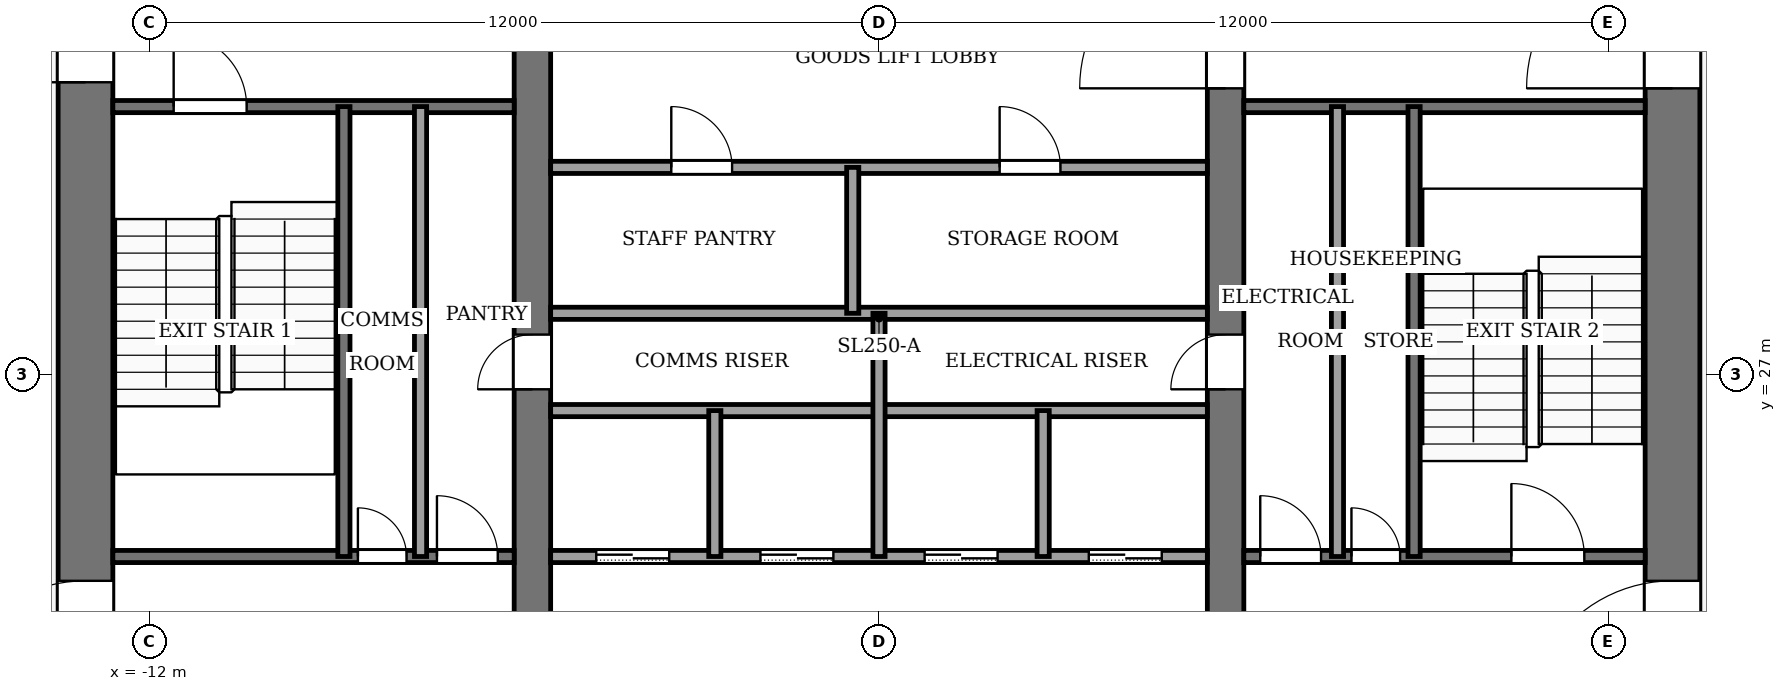
"""IFC4 building model, lengths in metres.
Left out: names, types, materials, properties, quantities, classifications, styles, units other than length and angle.
Written with IfcOpenShell. Run it as: python <this file> out.ifc"""

import sys

from ifc_helpers import new_model, si_unit, direction, frame, frame_2d, origin, place, context, subcontext, project, spatial, rectangle, extrude, element, fill, save


model = new_model("IFC4")
c1 = context("Model", 3, precision=1e-05, world=origin(), true_north=direction((0.0, 1.0)))
c2 = subcontext(c1, "Body", "Model", "MODEL_VIEW")
j1 = project(units=[si_unit("LENGTHUNIT", "METRE"), si_unit("PLANEANGLEUNIT", "RADIAN")], contexts=[c1])
p1 = place(None, origin())
s1 = spatial("IfcSite", under=j1, at=p1, CompositionType="ELEMENT")
p2 = place(p1, origin())
s2 = spatial("IfcBuilding", under=s1, at=p2, CompositionType="ELEMENT")
p3 = place(p2, frame((0.0, 0.0, 206.0)))
s3 = spatial("IfcBuildingStorey", under=s2, at=p3, CompositionType="ELEMENT", Elevation=206.0)
p4 = place(p3, frame((-13.05, 18.4, -0.13), z_axis=(0.0, 0.0, 1.0), x_axis=(0.0, 1.0, 0.0)))
e1 = element("IfcWall", 1, at=p4, inside=s3, PredefinedType="SHEAR", context=c2, shape_type="SweptSolid", body=[
    extrude(rectangle(XDim=19.2, YDim=0.9, at=frame_2d((9.6, 0.0))), origin(), (0.0, 0.0, 1.0), 4.0),
])
p5 = place(p4, frame((2.8, 0.0, 0.13)))
e2 = element("IfcOpeningElement", 2, at=p5, cuts=e1, PredefinedType="OPENING", context=c2, shape_type="SweptSolid", body=[
    extrude(rectangle(XDim=2.4, YDim=2.4, at=frame_2d((1.2, 1.2))), frame((0.0, 0.46, 0.0), z_axis=(0.0, -1.0, 0.0), x_axis=(1.0, 0.0, 0.0)), (0.0, 0.0, 1.0), 0.92),
])
p6 = place(p4, frame((13.4, 0.0, 0.13)))
e3 = element("IfcOpeningElement", 3, at=p6, cuts=e1, PredefinedType="OPENING", context=c2, shape_type="SweptSolid", body=[
    extrude(rectangle(XDim=1.4, YDim=2.2, at=frame_2d((0.7, 1.1))), frame((0.0, 0.46, 0.0), z_axis=(0.0, -1.0, 0.0), x_axis=(1.0, 0.0, 0.0)), (0.0, 0.0, 1.0), 0.92),
])
p7 = place(p3, frame((13.05, 18.4, -0.13), z_axis=(0.0, 0.0, 1.0), x_axis=(0.0, 1.0, 0.0)))
e4 = element("IfcWall", 4, at=p7, inside=s3, PredefinedType="SHEAR", context=c2, shape_type="SweptSolid", body=[
    extrude(rectangle(XDim=19.2, YDim=0.9, at=frame_2d((9.6, 0.0))), origin(), (0.0, 0.0, 1.0), 4.0),
])
p8 = place(p7, frame((2.8, 0.0, 0.13)))
e5 = element("IfcOpeningElement", 5, at=p8, cuts=e4, PredefinedType="OPENING", context=c2, shape_type="SweptSolid", body=[
    extrude(rectangle(XDim=2.4, YDim=2.4, at=frame_2d((1.2, 1.2))), frame((0.0, 0.46, 0.0), z_axis=(0.0, -1.0, 0.0), x_axis=(1.0, 0.0, 0.0)), (0.0, 0.0, 1.0), 0.92),
])
p9 = place(p7, frame((13.3, 0.0, 0.13)))
e6 = element("IfcOpeningElement", 6, at=p9, cuts=e4, PredefinedType="OPENING", context=c2, shape_type="SweptSolid", body=[
    extrude(rectangle(XDim=2.4, YDim=2.4, at=frame_2d((1.2, 1.2))), frame((0.0, 0.46, 0.0), z_axis=(0.0, -1.0, 0.0), x_axis=(1.0, 0.0, 0.0)), (0.0, 0.0, 1.0), 0.92),
])
p10 = place(p3, frame((-5.7, 18.4, -0.13), z_axis=(0.0, 0.0, 1.0), x_axis=(0.0, 1.0, 0.0)))
e7 = element("IfcWall", 7, at=p10, inside=s3, PredefinedType="SHEAR", context=c2, shape_type="SweptSolid", body=[
    extrude(rectangle(XDim=19.2, YDim=0.6, at=frame_2d((9.6, 0.0))), origin(), (0.0, 0.0, 1.0), 4.0),
])
p11 = place(p10, frame((8.35, 0.0, 0.13)))
e8 = element("IfcOpeningElement", 8, at=p11, cuts=e7, PredefinedType="OPENING", context=c2, shape_type="SweptSolid", body=[
    extrude(rectangle(XDim=0.9, YDim=2.1, at=frame_2d((0.45, 1.05))), frame((0.0, 0.31, 0.0), z_axis=(0.0, -1.0, 0.0), x_axis=(1.0, 0.0, 0.0)), (0.0, 0.0, 1.0), 0.62),
])
p12 = place(p3, frame((5.7, 18.4, -0.13), z_axis=(0.0, 0.0, 1.0), x_axis=(0.0, 1.0, 0.0)))
e9 = element("IfcWall", 9, at=p12, inside=s3, PredefinedType="SHEAR", context=c2, shape_type="SweptSolid", body=[
    extrude(rectangle(XDim=19.2, YDim=0.6, at=frame_2d((9.6, 0.0))), origin(), (0.0, 0.0, 1.0), 4.0),
])
p13 = place(p12, frame((8.35, 0.0, 0.13)))
e10 = element("IfcOpeningElement", 10, at=p13, cuts=e9, PredefinedType="OPENING", context=c2, shape_type="SweptSolid", body=[
    extrude(rectangle(XDim=0.9, YDim=2.1, at=frame_2d((0.45, 1.05))), frame((0.0, 0.31, 0.0), z_axis=(0.0, -1.0, 0.0), x_axis=(1.0, 0.0, 0.0)), (0.0, 0.0, 1.0), 0.62),
])
p14 = place(p12, frame((13.3, 0.0, 0.13)))
e11 = element("IfcOpeningElement", 11, at=p14, cuts=e9, PredefinedType="OPENING", context=c2, shape_type="SweptSolid", body=[
    extrude(rectangle(XDim=2.4, YDim=2.4, at=frame_2d((1.2, 1.2))), frame((0.0, 0.31, 0.0), z_axis=(0.0, -1.0, 0.0), x_axis=(1.0, 0.0, 0.0)), (0.0, 0.0, 1.0), 0.62),
])
p15 = place(p3, frame((-12.6, 24.0, 0.0), z_axis=(0.0, 0.0, 1.0), x_axis=(1.0, 0.0, 0.0)))
e12 = element("IfcWall", 12, at=p15, inside=s3, PredefinedType="PARTITIONING", context=c2, shape_type="SweptSolid", body=[
    extrude(rectangle(XDim=6.6, YDim=0.2, at=frame_2d((3.3, 0.0))), origin(), (0.0, 0.0, 1.0), 3.87),
])
p16 = place(p15, frame((4.03, 0.0, 0.0)))
e13 = element("IfcOpeningElement", 13, at=p16, cuts=e12, PredefinedType="OPENING", context=c2, shape_type="SweptSolid", body=[
    extrude(rectangle(XDim=0.8, YDim=2.1, at=frame_2d((0.4, 1.05))), frame((0.0, 0.11, 0.0), z_axis=(0.0, -1.0, 0.0), x_axis=(1.0, 0.0, 0.0)), (0.0, 0.0, 1.0), 0.22),
])
p17 = place(p15, frame((5.33, 0.0, 0.0)))
e14 = element("IfcOpeningElement", 14, at=p17, cuts=e12, PredefinedType="OPENING", context=c2, shape_type="SweptSolid", body=[
    extrude(rectangle(XDim=1.0, YDim=2.1, at=frame_2d((0.5, 1.05))), frame((0.0, 0.11, 0.0), z_axis=(0.0, -1.0, 0.0), x_axis=(1.0, 0.0, 0.0)), (0.0, 0.0, 1.0), 0.22),
])
p18 = place(p3, frame((-5.4, 24.0, 0.0), z_axis=(0.0, 0.0, 1.0), x_axis=(1.0, 0.0, 0.0)))
e15 = element("IfcWall", 15, at=p18, inside=s3, PredefinedType="PARTITIONING", context=c2, shape_type="SweptSolid", body=[
    extrude(rectangle(XDim=10.8, YDim=0.2, at=frame_2d((5.4, 0.0))), origin(), (0.0, 0.0, 1.0), 3.87),
])
p19 = place(p18, frame((0.75, 0.0, 0.0)))
e16 = element("IfcOpeningElement", 16, at=p19, cuts=e15, PredefinedType="OPENING", context=c2, shape_type="SweptSolid", body=[
    extrude(rectangle(XDim=1.2, YDim=2.2, at=frame_2d((0.6, 1.1))), frame((0.0, 0.11, 0.0), z_axis=(0.0, -1.0, 0.0), x_axis=(1.0, 0.0, 0.0)), (0.0, 0.0, 1.0), 0.22),
])
p20 = place(p18, frame((3.45, 0.0, 0.0)))
e17 = element("IfcOpeningElement", 17, at=p20, cuts=e15, PredefinedType="OPENING", context=c2, shape_type="SweptSolid", body=[
    extrude(rectangle(XDim=1.2, YDim=2.2, at=frame_2d((0.6, 1.1))), frame((0.0, 0.11, 0.0), z_axis=(0.0, -1.0, 0.0), x_axis=(1.0, 0.0, 0.0)), (0.0, 0.0, 1.0), 0.22),
])
p21 = place(p18, frame((6.15, 0.0, 0.0)))
e18 = element("IfcOpeningElement", 18, at=p21, cuts=e15, PredefinedType="OPENING", context=c2, shape_type="SweptSolid", body=[
    extrude(rectangle(XDim=1.2, YDim=2.2, at=frame_2d((0.6, 1.1))), frame((0.0, 0.11, 0.0), z_axis=(0.0, -1.0, 0.0), x_axis=(1.0, 0.0, 0.0)), (0.0, 0.0, 1.0), 0.22),
])
p22 = place(p18, frame((8.85, 0.0, 0.0)))
e19 = element("IfcOpeningElement", 19, at=p22, cuts=e15, PredefinedType="OPENING", context=c2, shape_type="SweptSolid", body=[
    extrude(rectangle(XDim=1.2, YDim=2.2, at=frame_2d((0.6, 1.1))), frame((0.0, 0.11, 0.0), z_axis=(0.0, -1.0, 0.0), x_axis=(1.0, 0.0, 0.0)), (0.0, 0.0, 1.0), 0.22),
])
p23 = place(p3, frame((6.0, 24.0, 0.0), z_axis=(0.0, 0.0, 1.0), x_axis=(1.0, 0.0, 0.0)))
e20 = element("IfcWall", 20, at=p23, inside=s3, PredefinedType="PARTITIONING", context=c2, shape_type="SweptSolid", body=[
    extrude(rectangle(XDim=6.6, YDim=0.2, at=frame_2d((3.3, 0.0))), origin(), (0.0, 0.0, 1.0), 3.87),
])
p24 = place(p23, frame((0.27, 0.0, 0.0)))
e21 = element("IfcOpeningElement", 21, at=p24, cuts=e20, PredefinedType="OPENING", context=c2, shape_type="SweptSolid", body=[
    extrude(rectangle(XDim=1.0, YDim=2.1, at=frame_2d((0.5, 1.05))), frame((0.0, 0.11, 0.0), z_axis=(0.0, -1.0, 0.0), x_axis=(1.0, 0.0, 0.0)), (0.0, 0.0, 1.0), 0.22),
])
p25 = place(p23, frame((1.77, 0.0, 0.0)))
e22 = element("IfcOpeningElement", 22, at=p25, cuts=e20, PredefinedType="OPENING", context=c2, shape_type="SweptSolid", body=[
    extrude(rectangle(XDim=0.8, YDim=2.1, at=frame_2d((0.4, 1.05))), frame((0.0, 0.11, 0.0), z_axis=(0.0, -1.0, 0.0), x_axis=(1.0, 0.0, 0.0)), (0.0, 0.0, 1.0), 0.22),
])
p26 = place(p23, frame((4.4, 0.0, 0.0)))
e23 = element("IfcOpeningElement", 23, at=p26, cuts=e20, PredefinedType="OPENING", context=c2, shape_type="SweptSolid", body=[
    extrude(rectangle(XDim=1.2, YDim=2.2, at=frame_2d((0.6, 1.1))), frame((0.0, 0.11, 0.0), z_axis=(0.0, -1.0, 0.0), x_axis=(1.0, 0.0, 0.0)), (0.0, 0.0, 1.0), 0.22),
])
for number, where, z_axis, x_axis in (
    (24, (-5.4, 26.4, 0.0), (0.0, 0.0, 1.0), (1.0, 0.0, 0.0)),
    (25, (-5.4, 28.0, 0.0), (0.0, 0.0, 1.0), (1.0, 0.0, 0.0)),
):
    element("IfcWall", number, at=place(p3, frame(where, z_axis=z_axis, x_axis=x_axis)), inside=s3, PredefinedType="PARTITIONING", context=c2, shape_type="SweptSolid", body=[
        extrude(rectangle(XDim=10.8, YDim=0.2, at=frame_2d((5.4, 0.0))), origin(), (0.0, 0.0, 1.0), 3.87),
    ])
p27 = place(p3, frame((-5.4, 30.4, 0.0), z_axis=(0.0, 0.0, 1.0), x_axis=(1.0, 0.0, 0.0)))
e26 = element("IfcWall", 26, at=p27, inside=s3, PredefinedType="PARTITIONING", context=c2, shape_type="SweptSolid", body=[
    extrude(rectangle(XDim=10.8, YDim=0.2, at=frame_2d((5.4, 0.0))), origin(), (0.0, 0.0, 1.0), 3.87),
])
p28 = place(p27, frame((1.984, 0.0, 0.0)))
e27 = element("IfcOpeningElement", 27, at=p28, cuts=e26, PredefinedType="OPENING", context=c2, shape_type="SweptSolid", body=[
    extrude(rectangle(XDim=1.0, YDim=2.1, at=frame_2d((0.5, 1.05))), frame((0.0, 0.11, 0.0), z_axis=(0.0, -1.0, 0.0), x_axis=(1.0, 0.0, 0.0)), (0.0, 0.0, 1.0), 0.22),
])
p29 = place(p27, frame((7.384, 0.0, 0.0)))
e28 = element("IfcOpeningElement", 28, at=p29, cuts=e26, PredefinedType="OPENING", context=c2, shape_type="SweptSolid", body=[
    extrude(rectangle(XDim=1.0, YDim=2.1, at=frame_2d((0.5, 1.05))), frame((0.0, 0.11, 0.0), z_axis=(0.0, -1.0, 0.0), x_axis=(1.0, 0.0, 0.0)), (0.0, 0.0, 1.0), 0.22),
])
p30 = place(p3, frame((-12.6, 31.4, 0.0), z_axis=(0.0, 0.0, 1.0), x_axis=(1.0, 0.0, 0.0)))
e29 = element("IfcWall", 29, at=p30, inside=s3, PredefinedType="PARTITIONING", context=c2, shape_type="SweptSolid", body=[
    extrude(rectangle(XDim=6.6, YDim=0.2, at=frame_2d((3.3, 0.0))), origin(), (0.0, 0.0, 1.0), 3.87),
])
p31 = place(p30, frame((1.0, 0.0, 0.0)))
e30 = element("IfcOpeningElement", 30, at=p31, cuts=e29, PredefinedType="OPENING", context=c2, shape_type="SweptSolid", body=[
    extrude(rectangle(XDim=1.2, YDim=2.2, at=frame_2d((0.6, 1.1))), frame((0.0, 0.11, 0.0), z_axis=(0.0, -1.0, 0.0), x_axis=(1.0, 0.0, 0.0)), (0.0, 0.0, 1.0), 0.22),
])
p32 = place(p3, frame((6.0, 31.4, 0.0), z_axis=(0.0, 0.0, 1.0), x_axis=(1.0, 0.0, 0.0)))
e31 = element("IfcWall", 31, at=p32, inside=s3, PredefinedType="PARTITIONING", context=c2, shape_type="SweptSolid", body=[
    extrude(rectangle(XDim=6.6, YDim=0.2, at=frame_2d((3.3, 0.0))), origin(), (0.0, 0.0, 1.0), 3.87),
])
for number, where, z_axis, x_axis in (
    (32, (-8.8, 24.0, 0.0), (0.0, 0.0, 1.0), (0.0, 1.0, 0.0)),
    (33, (-7.54, 24.0, 0.0), (0.0, 0.0, 1.0), (0.0, 1.0, 0.0)),
):
    element("IfcWall", number, at=place(p3, frame(where, z_axis=z_axis, x_axis=x_axis)), inside=s3, PredefinedType="PARTITIONING", context=c2, shape_type="SweptSolid", body=[
        extrude(rectangle(XDim=7.4, YDim=0.2, at=frame_2d((3.7, 0.0))), origin(), (0.0, 0.0, 1.0), 3.87),
    ])
for number, where, z_axis, x_axis in (
    (34, (-2.7, 24.0, 0.0), (0.0, 0.0, 1.0), (0.0, 1.0, 0.0)),
    (35, (-0.432, 28.0, 0.0), (0.0, 0.0, 1.0), (0.0, 1.0, 0.0)),
):
    element("IfcWall", number, at=place(p3, frame(where, z_axis=z_axis, x_axis=x_axis)), inside=s3, PredefinedType="PARTITIONING", context=c2, shape_type="SweptSolid", body=[
        extrude(rectangle(XDim=2.4, YDim=0.2, at=frame_2d((1.2, 0.0))), origin(), (0.0, 0.0, 1.0), 3.87),
    ])
p33 = place(p3, frame((0.0, 24.0, 0.0), z_axis=(0.0, 0.0, 1.0), x_axis=(0.0, 1.0, 0.0)))
e36 = element("IfcWall", 36, at=p33, inside=s3, PredefinedType="PARTITIONING", context=c2, shape_type="SweptSolid", body=[
    extrude(rectangle(XDim=4.0, YDim=0.2, at=frame_2d((2.0, 0.0))), origin(), (0.0, 0.0, 1.0), 3.87),
])
p34 = place(p3, frame((2.7, 24.0, 0.0), z_axis=(0.0, 0.0, 1.0), x_axis=(0.0, 1.0, 0.0)))
e37 = element("IfcWall", 37, at=p34, inside=s3, PredefinedType="PARTITIONING", context=c2, shape_type="SweptSolid", body=[
    extrude(rectangle(XDim=2.4, YDim=0.2, at=frame_2d((1.2, 0.0))), origin(), (0.0, 0.0, 1.0), 3.87),
])
for number, where, z_axis, x_axis in (
    (38, (7.54, 24.0, 0.0), (0.0, 0.0, 1.0), (0.0, 1.0, 0.0)),
    (39, (8.8, 24.0, 0.0), (0.0, 0.0, 1.0), (0.0, 1.0, 0.0)),
):
    element("IfcWall", number, at=place(p3, frame(where, z_axis=z_axis, x_axis=x_axis)), inside=s3, PredefinedType="PARTITIONING", context=c2, shape_type="SweptSolid", body=[
        extrude(rectangle(XDim=7.4, YDim=0.2, at=frame_2d((3.7, 0.0))), origin(), (0.0, 0.0, 1.0), 3.87),
    ])
p35 = place(p19, origin())
e40 = element("IfcDoor", 40, at=p35, inside=s3, OperationType="SLIDING_TO_LEFT", PredefinedType="DOOR", context=c2, shape_type="SweptSolid", body=[
    extrude(rectangle(XDim=1.2, YDim=2.2, at=frame_2d((0.6, 1.1))), frame((0.0, 0.025, 0.0), z_axis=(0.0, -1.0, 0.0), x_axis=(1.0, 0.0, 0.0)), (0.0, 0.0, 1.0), 0.05),
])
fill(e16, e40)
p36 = place(p20, origin())
e41 = element("IfcDoor", 41, at=p36, inside=s3, OperationType="SLIDING_TO_LEFT", PredefinedType="DOOR", context=c2, shape_type="SweptSolid", body=[
    extrude(rectangle(XDim=1.2, YDim=2.2, at=frame_2d((0.6, 1.1))), frame((0.0, 0.025, 0.0), z_axis=(0.0, -1.0, 0.0), x_axis=(1.0, 0.0, 0.0)), (0.0, 0.0, 1.0), 0.05),
])
fill(e17, e41)
p37 = place(p21, origin())
e42 = element("IfcDoor", 42, at=p37, inside=s3, OperationType="SLIDING_TO_LEFT", PredefinedType="DOOR", context=c2, shape_type="SweptSolid", body=[
    extrude(rectangle(XDim=1.2, YDim=2.2, at=frame_2d((0.6, 1.1))), frame((0.0, 0.025, 0.0), z_axis=(0.0, -1.0, 0.0), x_axis=(1.0, 0.0, 0.0)), (0.0, 0.0, 1.0), 0.05),
])
fill(e18, e42)
p38 = place(p22, origin())
e43 = element("IfcDoor", 43, at=p38, inside=s3, OperationType="SLIDING_TO_LEFT", PredefinedType="DOOR", context=c2, shape_type="SweptSolid", body=[
    extrude(rectangle(XDim=1.2, YDim=2.2, at=frame_2d((0.6, 1.1))), frame((0.0, 0.025, 0.0), z_axis=(0.0, -1.0, 0.0), x_axis=(1.0, 0.0, 0.0)), (0.0, 0.0, 1.0), 0.05),
])
fill(e19, e43)
p39 = place(p28, origin())
e44 = element("IfcDoor", 44, at=p39, inside=s3, OperationType="SINGLE_SWING_LEFT", PredefinedType="DOOR", context=c2, shape_type="SweptSolid", body=[
    extrude(rectangle(XDim=1.0, YDim=2.1, at=frame_2d((0.5, 1.05))), frame((0.0, 0.025, 0.0), z_axis=(0.0, -1.0, 0.0), x_axis=(1.0, 0.0, 0.0)), (0.0, 0.0, 1.0), 0.05),
])
fill(e27, e44)
p40 = place(p29, origin())
e45 = element("IfcDoor", 45, at=p40, inside=s3, OperationType="SINGLE_SWING_RIGHT", PredefinedType="DOOR", context=c2, shape_type="SweptSolid", body=[
    extrude(rectangle(XDim=1.0, YDim=2.1, at=frame_2d((0.5, 1.05))), frame((0.0, 0.025, 0.0), z_axis=(0.0, -1.0, 0.0), x_axis=(1.0, 0.0, 0.0)), (0.0, 0.0, 1.0), 0.05),
])
fill(e28, e45)
p41 = place(p16, origin())
e46 = element("IfcDoor", 46, at=p41, inside=s3, OperationType="SINGLE_SWING_RIGHT", PredefinedType="DOOR", context=c2, shape_type="SweptSolid", body=[
    extrude(rectangle(XDim=0.8, YDim=2.1, at=frame_2d((0.4, 1.05))), frame((0.0, 0.025, 0.0), z_axis=(0.0, -1.0, 0.0), x_axis=(1.0, 0.0, 0.0)), (0.0, 0.0, 1.0), 0.05),
])
fill(e13, e46)
p42 = place(p17, origin())
e47 = element("IfcDoor", 47, at=p42, inside=s3, OperationType="SINGLE_SWING_LEFT", PredefinedType="DOOR", context=c2, shape_type="SweptSolid", body=[
    extrude(rectangle(XDim=1.0, YDim=2.1, at=frame_2d((0.5, 1.05))), frame((0.0, 0.025, 0.0), z_axis=(0.0, -1.0, 0.0), x_axis=(1.0, 0.0, 0.0)), (0.0, 0.0, 1.0), 0.05),
])
fill(e14, e47)
p43 = place(p24, origin())
e48 = element("IfcDoor", 48, at=p43, inside=s3, OperationType="SINGLE_SWING_RIGHT", PredefinedType="DOOR", context=c2, shape_type="SweptSolid", body=[
    extrude(rectangle(XDim=1.0, YDim=2.1, at=frame_2d((0.5, 1.05))), frame((0.0, 0.025, 0.0), z_axis=(0.0, -1.0, 0.0), x_axis=(1.0, 0.0, 0.0)), (0.0, 0.0, 1.0), 0.05),
])
fill(e21, e48)
p44 = place(p25, origin())
e49 = element("IfcDoor", 49, at=p44, inside=s3, OperationType="SINGLE_SWING_LEFT", PredefinedType="DOOR", context=c2, shape_type="SweptSolid", body=[
    extrude(rectangle(XDim=0.8, YDim=2.1, at=frame_2d((0.4, 1.05))), frame((0.0, 0.025, 0.0), z_axis=(0.0, -1.0, 0.0), x_axis=(1.0, 0.0, 0.0)), (0.0, 0.0, 1.0), 0.05),
])
fill(e22, e49)
p45 = place(p11, origin())
e50 = element("IfcDoor", 50, at=p45, inside=s3, OperationType="SINGLE_SWING_RIGHT", PredefinedType="DOOR", context=c2, shape_type="SweptSolid", body=[
    extrude(rectangle(XDim=0.9, YDim=2.1, at=frame_2d((0.45, 1.05))), frame((0.0, 0.025, 0.0), z_axis=(0.0, -1.0, 0.0), x_axis=(1.0, 0.0, 0.0)), (0.0, 0.0, 1.0), 0.05),
])
fill(e8, e50)
p46 = place(p13, origin())
e51 = element("IfcDoor", 51, at=p46, inside=s3, OperationType="SINGLE_SWING_LEFT", PredefinedType="DOOR", context=c2, shape_type="SweptSolid", body=[
    extrude(rectangle(XDim=0.9, YDim=2.1, at=frame_2d((0.45, 1.05))), frame((0.0, 0.025, 0.0), z_axis=(0.0, -1.0, 0.0), x_axis=(1.0, 0.0, 0.0)), (0.0, 0.0, 1.0), 0.05),
])
fill(e10, e51)
p47 = place(p31, origin())
e52 = element("IfcDoor", 52, at=p47, inside=s3, OperationType="SINGLE_SWING_LEFT", PredefinedType="DOOR", context=c2, shape_type="SweptSolid", body=[
    extrude(rectangle(XDim=1.2, YDim=2.2, at=frame_2d((0.6, 1.1))), frame((0.0, 0.025, 0.0), z_axis=(0.0, -1.0, 0.0), x_axis=(1.0, 0.0, 0.0)), (0.0, 0.0, 1.0), 0.05),
])
fill(e30, e52)
p48 = place(p26, origin())
e53 = element("IfcDoor", 53, at=p48, inside=s3, OperationType="SINGLE_SWING_RIGHT", PredefinedType="DOOR", context=c2, shape_type="SweptSolid", body=[
    extrude(rectangle(XDim=1.2, YDim=2.2, at=frame_2d((0.6, 1.1))), frame((0.0, 0.025, 0.0), z_axis=(0.0, -1.0, 0.0), x_axis=(1.0, 0.0, 0.0)), (0.0, 0.0, 1.0), 0.05),
])
fill(e23, e53)
p49 = place(p14, origin())
e54 = element("IfcDoor", 54, at=p49, inside=s3, OperationType="DOUBLE_DOOR_SINGLE_SWING", PredefinedType="DOOR", context=c2, shape_type="SweptSolid", body=[
    extrude(rectangle(XDim=2.4, YDim=2.4, at=frame_2d((1.2, 1.2))), frame((0.0, 0.025, 0.0), z_axis=(0.0, -1.0, 0.0), x_axis=(1.0, 0.0, 0.0)), (0.0, 0.0, 1.0), 0.05),
])
fill(e11, e54)
p50 = place(p5, origin())
e55 = element("IfcDoor", 55, at=p50, inside=s3, OperationType="DOUBLE_DOOR_SINGLE_SWING", PredefinedType="DOOR", context=c2, shape_type="SweptSolid", body=[
    extrude(rectangle(XDim=2.4, YDim=2.4, at=frame_2d((1.2, 1.2))), frame((0.0, 0.025, 0.0), z_axis=(0.0, -1.0, 0.0), x_axis=(1.0, 0.0, 0.0)), (0.0, 0.0, 1.0), 0.05),
])
fill(e2, e55)
p51 = place(p8, origin())
e56 = element("IfcDoor", 56, at=p51, inside=s3, OperationType="DOUBLE_DOOR_SINGLE_SWING", PredefinedType="DOOR", context=c2, shape_type="SweptSolid", body=[
    extrude(rectangle(XDim=2.4, YDim=2.4, at=frame_2d((1.2, 1.2))), frame((0.0, 0.025, 0.0), z_axis=(0.0, -1.0, 0.0), x_axis=(1.0, 0.0, 0.0)), (0.0, 0.0, 1.0), 0.05),
])
fill(e5, e56)
p52 = place(p9, origin())
e57 = element("IfcDoor", 57, at=p52, inside=s3, OperationType="DOUBLE_DOOR_SINGLE_SWING", PredefinedType="DOOR", context=c2, shape_type="SweptSolid", body=[
    extrude(rectangle(XDim=2.4, YDim=2.4, at=frame_2d((1.2, 1.2))), frame((0.0, 0.025, 0.0), z_axis=(0.0, -1.0, 0.0), x_axis=(1.0, 0.0, 0.0)), (0.0, 0.0, 1.0), 0.05),
])
fill(e6, e57)
p53 = place(p6, origin())
e58 = element("IfcDoor", 58, at=p53, inside=s3, OperationType="SINGLE_SWING_LEFT", PredefinedType="DOOR", context=c2, shape_type="SweptSolid", body=[
    extrude(rectangle(XDim=1.4, YDim=2.2, at=frame_2d((0.7, 1.1))), frame((0.0, 0.025, 0.0), z_axis=(0.0, -1.0, 0.0), x_axis=(1.0, 0.0, 0.0)), (0.0, 0.0, 1.0), 0.05),
])
fill(e3, e58)
save(model, sys.argv[1])
